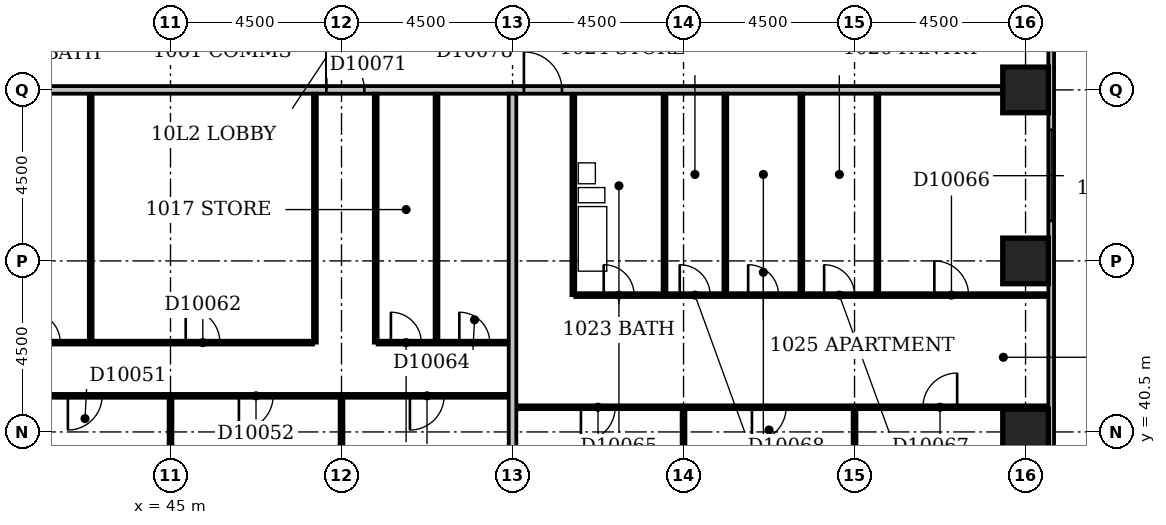
"""IFC4 building model, lengths in metres.
Left out: names, types, materials, properties, quantities, classifications, styles, units other than length and angle.
Written with IfcOpenShell. Run it as: python <this file> out.ifc"""

import sys

from ifc_helpers import new_model, si_unit, direction, frame, frame_2d, origin, origin_2d, place, context, subcontext, project, spatial, rectangle, extrude, element, fill, save


model = new_model("IFC4")
c1 = context("Model", 3, precision=1e-05, world=origin(), true_north=direction((0.0, 1.0)))
c2 = subcontext(c1, "Body", "Model", "MODEL_VIEW")
j1 = project(units=[si_unit("LENGTHUNIT", "METRE"), si_unit("PLANEANGLEUNIT", "RADIAN")], contexts=[c1])
p1 = place(None, origin())
s1 = spatial("IfcSite", under=j1, at=p1, CompositionType="ELEMENT")
p2 = place(p1, origin())
s2 = spatial("IfcBuilding", under=s1, at=p2, CompositionType="ELEMENT")
p3 = place(p2, frame((0.0, 0.0, 47.0)))
s3 = spatial("IfcBuildingStorey", under=s2, at=p3, CompositionType="ELEMENT", Elevation=47.0)
for number, where, z_axis, x_axis in (
    (1, (67.5, 40.5, -0.3), (0.0, 0.0, 1.0), (1.0, 0.0, 0.0)),
    (2, (67.5, 45.0, -0.3), (0.0, 0.0, 1.0), (1.0, 0.0, 0.0)),
    (3, (67.5, 49.5, -0.3), (0.0, 0.0, 1.0), (1.0, 0.0, 0.0)),
):
    element("IfcColumn", number, at=place(p3, frame(where, z_axis=z_axis, x_axis=x_axis)), inside=s3, PredefinedType="COLUMN", context=c2, shape_type="SweptSolid", body=[
        extrude(rectangle(XDim=1.2, YDim=1.2, at=origin_2d()), origin(), (0.0, 0.0, 1.0), 3.6),
    ])
p4 = place(p3, frame((68.175, 35.4, 0.0), z_axis=(0.0, 0.0, 1.0), x_axis=(0.0, 1.0, 0.0)))
e4 = element("IfcWall", 4, at=p4, inside=s3, PredefinedType="STANDARD", context=c2, shape_type="SweptSolid", body=[
    extrude(rectangle(XDim=23.85, YDim=0.15, at=frame_2d((11.925, 0.0))), origin(), (0.0, 0.0, 1.0), 2.7),
])
p5 = place(p4, frame((2.67, 0.0, 0.6)))
e5 = element("IfcOpeningElement", 5, at=p5, cuts=e4, PredefinedType="OPENING", context=c2, shape_type="SweptSolid", body=[
    extrude(rectangle(XDim=1.5, YDim=1.8, at=frame_2d((0.75, 0.9))), frame((0.0, 0.087, 0.0), z_axis=(0.0, -1.0, 0.0), x_axis=(1.0, 0.0, 0.0)), (0.0, 0.0, 1.0), 0.174),
])
p6 = place(p4, frame((10.65, 0.0, 0.6)))
e6 = element("IfcOpeningElement", 6, at=p6, cuts=e4, PredefinedType="OPENING", context=c2, shape_type="SweptSolid", body=[
    extrude(rectangle(XDim=2.4, YDim=1.8, at=frame_2d((1.2, 0.9))), frame((0.0, 0.087, 0.0), z_axis=(0.0, -1.0, 0.0), x_axis=(1.0, 0.0, 0.0)), (0.0, 0.0, 1.0), 0.174),
])
p7 = place(p4, frame((19.5, 0.0, 0.6)))
e7 = element("IfcOpeningElement", 7, at=p7, cuts=e4, PredefinedType="OPENING", context=c2, shape_type="SweptSolid", body=[
    extrude(rectangle(XDim=2.1, YDim=1.8, at=frame_2d((1.05, 0.9))), frame((0.0, 0.087, 0.0), z_axis=(0.0, -1.0, 0.0), x_axis=(1.0, 0.0, 0.0)), (0.0, 0.0, 1.0), 0.174),
])
p8 = place(p3, frame((45.0, 36.6, 0.0), z_axis=(0.0, 0.0, 1.0), x_axis=(0.0, 1.0, 0.0)))
e8 = element("IfcWall", 8, at=p8, inside=s3, PredefinedType="PARTITIONING", context=c2, shape_type="SweptSolid", body=[
    extrude(rectangle(XDim=4.8, YDim=0.1, at=frame_2d((2.4, 0.0))), origin(), (0.0, 0.0, 1.0), 2.6),
])
p9 = place(p3, frame((49.5, 36.6, 0.0), z_axis=(0.0, 0.0, 1.0), x_axis=(0.0, 1.0, 0.0)))
e9 = element("IfcWall", 9, at=p9, inside=s3, PredefinedType="PARTITIONING", context=c2, shape_type="SweptSolid", body=[
    extrude(rectangle(XDim=4.8, YDim=0.1, at=frame_2d((2.4, 0.0))), origin(), (0.0, 0.0, 1.0), 3.3),
])
p10 = place(p3, frame((54.0, 36.6, 0.0), z_axis=(0.0, 0.0, 1.0), x_axis=(0.0, 1.0, 0.0)))
e10 = element("IfcWall", 10, at=p10, inside=s3, PredefinedType="PARTITIONING", context=c2, shape_type="SweptSolid", body=[
    extrude(rectangle(XDim=12.8, YDim=0.2, at=frame_2d((6.4, 0.0))), origin(), (0.0, 0.0, 1.0), 2.6),
])
p11 = place(p3, frame((58.5, 36.6, 0.0), z_axis=(0.0, 0.0, 1.0), x_axis=(0.0, 1.0, 0.0)))
e11 = element("IfcWall", 11, at=p11, inside=s3, PredefinedType="PARTITIONING", context=c2, shape_type="SweptSolid", body=[
    extrude(rectangle(XDim=4.5, YDim=0.1, at=frame_2d((2.25, 0.0))), origin(), (0.0, 0.0, 1.0), 3.3),
])
p12 = place(p3, frame((63.0, 36.6, 0.0), z_axis=(0.0, 0.0, 1.0), x_axis=(0.0, 1.0, 0.0)))
e12 = element("IfcWall", 12, at=p12, inside=s3, PredefinedType="PARTITIONING", context=c2, shape_type="SweptSolid", body=[
    extrude(rectangle(XDim=4.5, YDim=0.1, at=frame_2d((2.25, 0.0))), origin(), (0.0, 0.0, 1.0), 2.4),
])
p13 = place(p3, frame((54.1, 41.15, 0.0), z_axis=(0.0, 0.0, 1.0), x_axis=(1.0, 0.0, 0.0)))
e13 = element("IfcWall", 13, at=p13, inside=s3, PredefinedType="PARTITIONING", context=c2, shape_type="SweptSolid", body=[
    extrude(rectangle(XDim=14.0, YDim=0.1, at=frame_2d((7.0, 0.0))), origin(), (0.0, 0.0, 1.0), 3.3),
])
p14 = place(p13, frame((1.7, 0.0, 0.0)))
e14 = element("IfcOpeningElement", 14, at=p14, cuts=e13, PredefinedType="OPENING", context=c2, shape_type="SweptSolid", body=[
    extrude(rectangle(XDim=0.9, YDim=2.1, at=frame_2d((0.45, 1.05))), frame((0.0, 0.062, 0.0), z_axis=(0.0, -1.0, 0.0), x_axis=(1.0, 0.0, 0.0)), (0.0, 0.0, 1.0), 0.124),
])
p15 = place(p13, frame((6.2, 0.0, 0.0)))
e15 = element("IfcOpeningElement", 15, at=p15, cuts=e13, PredefinedType="OPENING", context=c2, shape_type="SweptSolid", body=[
    extrude(rectangle(XDim=0.9, YDim=2.1, at=frame_2d((0.45, 1.05))), frame((0.0, 0.062, 0.0), z_axis=(0.0, -1.0, 0.0), x_axis=(1.0, 0.0, 0.0)), (0.0, 0.0, 1.0), 0.124),
])
p16 = place(p13, frame((10.7, 0.0, 0.0)))
e16 = element("IfcOpeningElement", 16, at=p16, cuts=e13, PredefinedType="OPENING", context=c2, shape_type="SweptSolid", body=[
    extrude(rectangle(XDim=0.9, YDim=2.1, at=frame_2d((0.45, 1.05))), frame((0.0, 0.062, 0.0), z_axis=(0.0, -1.0, 0.0), x_axis=(1.0, 0.0, 0.0)), (0.0, 0.0, 1.0), 0.124),
])
p17 = place(p3, frame((40.6, 41.45, 0.0), z_axis=(0.0, 0.0, 1.0), x_axis=(1.0, 0.0, 0.0)))
e17 = element("IfcWall", 17, at=p17, inside=s3, PredefinedType="PARTITIONING", context=c2, shape_type="SweptSolid", body=[
    extrude(rectangle(XDim=13.3, YDim=0.1, at=frame_2d((6.65, 0.0))), origin(), (0.0, 0.0, 1.0), 3.3),
])
p18 = place(p17, frame((1.7, 0.0, 0.0)))
e18 = element("IfcOpeningElement", 18, at=p18, cuts=e17, PredefinedType="OPENING", context=c2, shape_type="SweptSolid", body=[
    extrude(rectangle(XDim=0.9, YDim=2.1, at=frame_2d((0.45, 1.05))), frame((0.0, 0.062, 0.0), z_axis=(0.0, -1.0, 0.0), x_axis=(1.0, 0.0, 0.0)), (0.0, 0.0, 1.0), 0.124),
])
p19 = place(p17, frame((6.2, 0.0, 0.0)))
e19 = element("IfcOpeningElement", 19, at=p19, cuts=e17, PredefinedType="OPENING", context=c2, shape_type="SweptSolid", body=[
    extrude(rectangle(XDim=0.9, YDim=2.1, at=frame_2d((0.45, 1.05))), frame((0.0, 0.062, 0.0), z_axis=(0.0, -1.0, 0.0), x_axis=(1.0, 0.0, 0.0)), (0.0, 0.0, 1.0), 0.124),
])
p20 = place(p17, frame((10.7, 0.0, 0.0)))
e20 = element("IfcOpeningElement", 20, at=p20, cuts=e17, PredefinedType="OPENING", context=c2, shape_type="SweptSolid", body=[
    extrude(rectangle(XDim=0.9, YDim=2.1, at=frame_2d((0.45, 1.05))), frame((0.0, 0.062, 0.0), z_axis=(0.0, -1.0, 0.0), x_axis=(1.0, 0.0, 0.0)), (0.0, 0.0, 1.0), 0.124),
])
p21 = place(p3, frame((40.6, 42.85, 0.0), z_axis=(0.0, 0.0, 1.0), x_axis=(1.0, 0.0, 0.0)))
e21 = element("IfcWall", 21, at=p21, inside=s3, PredefinedType="PARTITIONING", context=c2, shape_type="SweptSolid", body=[
    extrude(rectangle(XDim=8.15, YDim=0.1, at=frame_2d((4.075, 0.0))), origin(), (0.0, 0.0, 1.0), 3.3),
])
p22 = place(p21, frame((0.7, 0.0, 0.0)))
e22 = element("IfcOpeningElement", 22, at=p22, cuts=e21, PredefinedType="OPENING", context=c2, shape_type="SweptSolid", body=[
    extrude(rectangle(XDim=0.8, YDim=2.1, at=frame_2d((0.4, 1.05))), frame((0.0, 0.062, 0.0), z_axis=(0.0, -1.0, 0.0), x_axis=(1.0, 0.0, 0.0)), (0.0, 0.0, 1.0), 0.124),
])
p23 = place(p21, frame((4.8, 0.0, 0.0)))
e23 = element("IfcOpeningElement", 23, at=p23, cuts=e21, PredefinedType="OPENING", context=c2, shape_type="SweptSolid", body=[
    extrude(rectangle(XDim=0.9, YDim=2.1, at=frame_2d((0.45, 1.05))), frame((0.0, 0.062, 0.0), z_axis=(0.0, -1.0, 0.0), x_axis=(1.0, 0.0, 0.0)), (0.0, 0.0, 1.0), 0.124),
])
for number, where, z_axis, x_axis in (
    (24, (48.8, 42.85, 0.0), (0.0, 0.0, 1.0), (0.0, 1.0, 0.0)),
    (25, (50.4, 42.85, 0.0), (0.0, 0.0, 1.0), (0.0, 1.0, 0.0)),
):
    element("IfcWall", number, at=place(p3, frame(where, z_axis=z_axis, x_axis=x_axis)), inside=s3, PredefinedType="PARTITIONING", context=c2, shape_type="SweptSolid", body=[
        extrude(rectangle(XDim=6.55, YDim=0.1, at=frame_2d((3.275, 0.0))), origin(), (0.0, 0.0, 1.0), 3.3),
    ])
p24 = place(p3, frame((50.45, 42.85, 0.0), z_axis=(0.0, 0.0, 1.0), x_axis=(1.0, 0.0, 0.0)))
e26 = element("IfcWall", 26, at=p24, inside=s3, PredefinedType="PARTITIONING", context=c2, shape_type="SweptSolid", body=[
    extrude(rectangle(XDim=3.45, YDim=0.1, at=frame_2d((1.725, 0.0))), origin(), (0.0, 0.0, 1.0), 3.3),
])
p25 = place(p24, frame((0.35, 0.0, 0.0)))
e27 = element("IfcOpeningElement", 27, at=p25, cuts=e26, PredefinedType="OPENING", context=c2, shape_type="SweptSolid", body=[
    extrude(rectangle(XDim=0.8, YDim=2.1, at=frame_2d((0.4, 1.05))), frame((0.0, 0.062, 0.0), z_axis=(0.0, -1.0, 0.0), x_axis=(1.0, 0.0, 0.0)), (0.0, 0.0, 1.0), 0.124),
])
p26 = place(p24, frame((2.15, 0.0, 0.0)))
e28 = element("IfcOpeningElement", 28, at=p26, cuts=e26, PredefinedType="OPENING", context=c2, shape_type="SweptSolid", body=[
    extrude(rectangle(XDim=0.8, YDim=2.1, at=frame_2d((0.4, 1.05))), frame((0.0, 0.062, 0.0), z_axis=(0.0, -1.0, 0.0), x_axis=(1.0, 0.0, 0.0)), (0.0, 0.0, 1.0), 0.124),
])
p27 = place(p3, frame((42.9, 42.9, 0.0), z_axis=(0.0, 0.0, 1.0), x_axis=(0.0, 1.0, 0.0)))
e29 = element("IfcWall", 29, at=p27, inside=s3, PredefinedType="PLUMBINGWALL", context=c2, shape_type="SweptSolid", body=[
    extrude(rectangle(XDim=6.5, YDim=0.1, at=frame_2d((3.25, 0.0))), origin(), (0.0, 0.0, 1.0), 3.3),
])
p28 = place(p3, frame((52.0, 42.9, 0.0), z_axis=(0.0, 0.0, 1.0), x_axis=(0.0, 1.0, 0.0)))
e30 = element("IfcWall", 30, at=p28, inside=s3, PredefinedType="PARTITIONING", context=c2, shape_type="SweptSolid", body=[
    extrude(rectangle(XDim=6.5, YDim=0.1, at=frame_2d((3.25, 0.0))), origin(), (0.0, 0.0, 1.0), 3.3),
])
p29 = place(p3, frame((55.6, 44.1, 0.0), z_axis=(0.0, 0.0, 1.0), x_axis=(0.0, 1.0, 0.0)))
e31 = element("IfcWall", 31, at=p29, inside=s3, PredefinedType="PLUMBINGWALL", context=c2, shape_type="SweptSolid", body=[
    extrude(rectangle(XDim=5.3, YDim=0.1, at=frame_2d((2.65, 0.0))), origin(), (0.0, 0.0, 1.0), 3.3),
])
p30 = place(p3, frame((55.65, 44.1, 0.0), z_axis=(0.0, 0.0, 1.0), x_axis=(1.0, 0.0, 0.0)))
e32 = element("IfcWall", 32, at=p30, inside=s3, PredefinedType="PARTITIONING", context=c2, shape_type="SweptSolid", body=[
    extrude(rectangle(XDim=12.45, YDim=0.1, at=frame_2d((6.225, 0.0))), origin(), (0.0, 0.0, 1.0), 3.3),
])
p31 = place(p30, frame((0.75, 0.0, 0.0)))
e33 = element("IfcOpeningElement", 33, at=p31, cuts=e32, PredefinedType="OPENING", context=c2, shape_type="SweptSolid", body=[
    extrude(rectangle(XDim=0.8, YDim=2.1, at=frame_2d((0.4, 1.05))), frame((0.0, 0.062, 0.0), z_axis=(0.0, -1.0, 0.0), x_axis=(1.0, 0.0, 0.0)), (0.0, 0.0, 1.0), 0.124),
])
p32 = place(p30, frame((9.45, 0.0, 0.0)))
e34 = element("IfcOpeningElement", 34, at=p32, cuts=e32, PredefinedType="OPENING", context=c2, shape_type="SweptSolid", body=[
    extrude(rectangle(XDim=0.9, YDim=2.1, at=frame_2d((0.45, 1.05))), frame((0.0, 0.062, 0.0), z_axis=(0.0, -1.0, 0.0), x_axis=(1.0, 0.0, 0.0)), (0.0, 0.0, 1.0), 0.124),
])
p33 = place(p30, frame((6.55, 0.0, 0.0)))
e35 = element("IfcOpeningElement", 35, at=p33, cuts=e32, PredefinedType="OPENING", context=c2, shape_type="SweptSolid", body=[
    extrude(rectangle(XDim=0.8, YDim=2.1, at=frame_2d((0.4, 1.05))), frame((0.0, 0.062, 0.0), z_axis=(0.0, -1.0, 0.0), x_axis=(1.0, 0.0, 0.0)), (0.0, 0.0, 1.0), 0.124),
])
p34 = place(p30, frame((2.75, 0.0, 0.0)))
e36 = element("IfcOpeningElement", 36, at=p34, cuts=e32, PredefinedType="OPENING", context=c2, shape_type="SweptSolid", body=[
    extrude(rectangle(XDim=0.8, YDim=2.1, at=frame_2d((0.4, 1.05))), frame((0.0, 0.062, 0.0), z_axis=(0.0, -1.0, 0.0), x_axis=(1.0, 0.0, 0.0)), (0.0, 0.0, 1.0), 0.124),
])
p35 = place(p30, frame((4.55, 0.0, 0.0)))
e37 = element("IfcOpeningElement", 37, at=p35, cuts=e32, PredefinedType="OPENING", context=c2, shape_type="SweptSolid", body=[
    extrude(rectangle(XDim=0.8, YDim=2.1, at=frame_2d((0.4, 1.05))), frame((0.0, 0.062, 0.0), z_axis=(0.0, -1.0, 0.0), x_axis=(1.0, 0.0, 0.0)), (0.0, 0.0, 1.0), 0.124),
])
p36 = place(p3, frame((58.0, 44.15, 0.0), z_axis=(0.0, 0.0, 1.0), x_axis=(0.0, 1.0, 0.0)))
e38 = element("IfcWall", 38, at=p36, inside=s3, PredefinedType="PLUMBINGWALL", context=c2, shape_type="SweptSolid", body=[
    extrude(rectangle(XDim=5.25, YDim=0.1, at=frame_2d((2.625, 0.0))), origin(), (0.0, 0.0, 1.0), 3.3),
])
for number, where, z_axis, x_axis in (
    (39, (59.6, 44.15, 0.0), (0.0, 0.0, 1.0), (0.0, 1.0, 0.0)),
    (40, (61.6, 44.15, 0.0), (0.0, 0.0, 1.0), (0.0, 1.0, 0.0)),
):
    element("IfcWall", number, at=place(p3, frame(where, z_axis=z_axis, x_axis=x_axis)), inside=s3, PredefinedType="PARTITIONING", context=c2, shape_type="SweptSolid", body=[
        extrude(rectangle(XDim=5.25, YDim=0.1, at=frame_2d((2.625, 0.0))), origin(), (0.0, 0.0, 1.0), 3.3),
    ])
p37 = place(p3, frame((63.6, 44.15, 0.0), z_axis=(0.0, 0.0, 1.0), x_axis=(0.0, 1.0, 0.0)))
e41 = element("IfcWall", 41, at=p37, inside=s3, PredefinedType="PARTITIONING", context=c2, shape_type="SweptSolid", body=[
    extrude(rectangle(XDim=5.25, YDim=0.1, at=frame_2d((2.625, 0.0))), origin(), (0.0, 0.0, 1.0), 2.4),
])
p38 = place(p3, frame((9.1, 49.5, 0.0), z_axis=(0.0, 0.0, 1.0), x_axis=(1.0, 0.0, 0.0)))
e42 = element("IfcWall", 42, at=p38, inside=s3, PredefinedType="PARTITIONING", context=c2, shape_type="SweptSolid", body=[
    extrude(rectangle(XDim=57.8, YDim=0.2, at=frame_2d((28.9, 0.0))), origin(), (0.0, 0.0, 1.0), 3.3),
])
p39 = place(p38, frame((16.1, 0.0, 0.0)))
e43 = element("IfcOpeningElement", 43, at=p39, cuts=e42, PredefinedType="OPENING", context=c2, shape_type="SweptSolid", body=[
    extrude(rectangle(XDim=1.0, YDim=2.1, at=frame_2d((0.5, 1.05))), frame((0.0, 0.112, 0.0), z_axis=(0.0, -1.0, 0.0), x_axis=(1.0, 0.0, 0.0)), (0.0, 0.0, 1.0), 0.224),
])
p40 = place(p38, frame((40.0, 0.0, 0.0)))
e44 = element("IfcOpeningElement", 44, at=p40, cuts=e42, PredefinedType="OPENING", context=c2, shape_type="SweptSolid", body=[
    extrude(rectangle(XDim=1.0, YDim=2.1, at=frame_2d((0.5, 1.05))), frame((0.0, 0.112, 0.0), z_axis=(0.0, -1.0, 0.0), x_axis=(1.0, 0.0, 0.0)), (0.0, 0.0, 1.0), 0.224),
])
p41 = place(p38, frame((45.2, 0.0, 0.0)))
e45 = element("IfcOpeningElement", 45, at=p41, cuts=e42, PredefinedType="OPENING", context=c2, shape_type="SweptSolid", body=[
    extrude(rectangle(XDim=1.0, YDim=2.1, at=frame_2d((0.5, 1.05))), frame((0.0, 0.112, 0.0), z_axis=(0.0, -1.0, 0.0), x_axis=(1.0, 0.0, 0.0)), (0.0, 0.0, 1.0), 0.224),
])
p42 = place(p38, frame((3.9, 0.0, 0.0)))
e46 = element("IfcOpeningElement", 46, at=p42, cuts=e42, PredefinedType="OPENING", context=c2, shape_type="SweptSolid", body=[
    extrude(rectangle(XDim=0.9, YDim=2.1, at=frame_2d((0.45, 1.05))), frame((0.0, 0.112, 0.0), z_axis=(0.0, -1.0, 0.0), x_axis=(1.0, 0.0, 0.0)), (0.0, 0.0, 1.0), 0.224),
])
p43 = place(p6, origin())
e47 = element("IfcWindow", 47, at=p43, inside=s3, PartitioningType="SINGLE_PANEL", PredefinedType="WINDOW", context=c2, shape_type="SweptSolid", body=[
    extrude(rectangle(XDim=2.4, YDim=1.8, at=frame_2d((1.2, 0.9))), frame((0.0, 0.03, 0.0), z_axis=(0.0, -1.0, 0.0), x_axis=(1.0, 0.0, 0.0)), (0.0, 0.0, 1.0), 0.06),
])
fill(e6, e47)
p44 = place(p14, frame((0.9, 0.0, 0.0), z_axis=(0.0, 0.0, 1.0), x_axis=(-1.0, 0.0, 0.0)))
e48 = element("IfcDoor", 48, at=p44, inside=s3, OperationType="SINGLE_SWING_RIGHT", PredefinedType="DOOR", context=c2, shape_type="SweptSolid", body=[
    extrude(rectangle(XDim=0.9, YDim=2.1, at=frame_2d((0.45, 1.05))), frame((0.0, 0.025, 0.0), z_axis=(0.0, -1.0, 0.0), x_axis=(1.0, 0.0, 0.0)), (0.0, 0.0, 1.0), 0.05),
])
fill(e14, e48)
p45 = place(p15, frame((0.9, 0.0, 0.0), z_axis=(0.0, 0.0, 1.0), x_axis=(-1.0, 0.0, 0.0)))
e49 = element("IfcDoor", 49, at=p45, inside=s3, OperationType="SINGLE_SWING_RIGHT", PredefinedType="DOOR", context=c2, shape_type="SweptSolid", body=[
    extrude(rectangle(XDim=0.9, YDim=2.1, at=frame_2d((0.45, 1.05))), frame((0.0, 0.025, 0.0), z_axis=(0.0, -1.0, 0.0), x_axis=(1.0, 0.0, 0.0)), (0.0, 0.0, 1.0), 0.05),
])
fill(e15, e49)
p46 = place(p16, frame((0.9, 0.0, 0.0), z_axis=(0.0, 0.0, 1.0), x_axis=(-1.0, 0.0, 0.0)))
e50 = element("IfcDoor", 50, at=p46, inside=s3, OperationType="SINGLE_SWING_LEFT", PredefinedType="DOOR", context=c2, shape_type="SweptSolid", body=[
    extrude(rectangle(XDim=0.9, YDim=2.1, at=frame_2d((0.45, 1.05))), frame((0.0, 0.025, 0.0), z_axis=(0.0, -1.0, 0.0), x_axis=(1.0, 0.0, 0.0)), (0.0, 0.0, 1.0), 0.05),
])
fill(e16, e50)
p47 = place(p18, frame((0.9, 0.0, 0.0), z_axis=(0.0, 0.0, 1.0), x_axis=(-1.0, 0.0, 0.0)))
e51 = element("IfcDoor", 51, at=p47, inside=s3, OperationType="SINGLE_SWING_RIGHT", PredefinedType="DOOR", context=c2, shape_type="SweptSolid", body=[
    extrude(rectangle(XDim=0.9, YDim=2.1, at=frame_2d((0.45, 1.05))), frame((0.0, 0.025, 0.0), z_axis=(0.0, -1.0, 0.0), x_axis=(1.0, 0.0, 0.0)), (0.0, 0.0, 1.0), 0.05),
])
fill(e18, e51)
p48 = place(p19, frame((0.9, 0.0, 0.0), z_axis=(0.0, 0.0, 1.0), x_axis=(-1.0, 0.0, 0.0)))
e52 = element("IfcDoor", 52, at=p48, inside=s3, OperationType="SINGLE_SWING_RIGHT", PredefinedType="DOOR", context=c2, shape_type="SweptSolid", body=[
    extrude(rectangle(XDim=0.9, YDim=2.1, at=frame_2d((0.45, 1.05))), frame((0.0, 0.025, 0.0), z_axis=(0.0, -1.0, 0.0), x_axis=(1.0, 0.0, 0.0)), (0.0, 0.0, 1.0), 0.05),
])
fill(e19, e52)
p49 = place(p20, frame((0.9, 0.0, 0.0), z_axis=(0.0, 0.0, 1.0), x_axis=(-1.0, 0.0, 0.0)))
e53 = element("IfcDoor", 53, at=p49, inside=s3, OperationType="SINGLE_SWING_RIGHT", PredefinedType="DOOR", context=c2, shape_type="SweptSolid", body=[
    extrude(rectangle(XDim=0.9, YDim=2.1, at=frame_2d((0.45, 1.05))), frame((0.0, 0.025, 0.0), z_axis=(0.0, -1.0, 0.0), x_axis=(1.0, 0.0, 0.0)), (0.0, 0.0, 1.0), 0.05),
])
fill(e20, e53)
p50 = place(p22, origin())
e54 = element("IfcDoor", 54, at=p50, inside=s3, OperationType="SINGLE_SWING_LEFT", PredefinedType="DOOR", context=c2, shape_type="SweptSolid", body=[
    extrude(rectangle(XDim=0.8, YDim=2.1, at=frame_2d((0.4, 1.05))), frame((0.0, 0.025, 0.0), z_axis=(0.0, -1.0, 0.0), x_axis=(1.0, 0.0, 0.0)), (0.0, 0.0, 1.0), 0.05),
])
fill(e22, e54)
p51 = place(p23, origin())
e55 = element("IfcDoor", 55, at=p51, inside=s3, OperationType="SINGLE_SWING_LEFT", PredefinedType="DOOR", context=c2, shape_type="SweptSolid", body=[
    extrude(rectangle(XDim=0.9, YDim=2.1, at=frame_2d((0.45, 1.05))), frame((0.0, 0.025, 0.0), z_axis=(0.0, -1.0, 0.0), x_axis=(1.0, 0.0, 0.0)), (0.0, 0.0, 1.0), 0.05),
])
fill(e23, e55)
p52 = place(p25, origin())
e56 = element("IfcDoor", 56, at=p52, inside=s3, OperationType="SINGLE_SWING_LEFT", PredefinedType="DOOR", context=c2, shape_type="SweptSolid", body=[
    extrude(rectangle(XDim=0.8, YDim=2.1, at=frame_2d((0.4, 1.05))), frame((0.0, 0.025, 0.0), z_axis=(0.0, -1.0, 0.0), x_axis=(1.0, 0.0, 0.0)), (0.0, 0.0, 1.0), 0.05),
])
fill(e27, e56)
p53 = place(p26, origin())
e57 = element("IfcDoor", 57, at=p53, inside=s3, OperationType="SINGLE_SWING_LEFT", PredefinedType="DOOR", context=c2, shape_type="SweptSolid", body=[
    extrude(rectangle(XDim=0.8, YDim=2.1, at=frame_2d((0.4, 1.05))), frame((0.0, 0.025, 0.0), z_axis=(0.0, -1.0, 0.0), x_axis=(1.0, 0.0, 0.0)), (0.0, 0.0, 1.0), 0.05),
])
fill(e28, e57)
p54 = place(p31, origin())
e58 = element("IfcDoor", 58, at=p54, inside=s3, OperationType="SINGLE_SWING_LEFT", PredefinedType="DOOR", context=c2, shape_type="SweptSolid", body=[
    extrude(rectangle(XDim=0.8, YDim=2.1, at=frame_2d((0.4, 1.05))), frame((0.0, 0.025, 0.0), z_axis=(0.0, -1.0, 0.0), x_axis=(1.0, 0.0, 0.0)), (0.0, 0.0, 1.0), 0.05),
])
fill(e33, e58)
p55 = place(p32, origin())
e59 = element("IfcDoor", 59, at=p55, inside=s3, OperationType="SINGLE_SWING_LEFT", PredefinedType="DOOR", context=c2, shape_type="SweptSolid", body=[
    extrude(rectangle(XDim=0.9, YDim=2.1, at=frame_2d((0.45, 1.05))), frame((0.0, 0.025, 0.0), z_axis=(0.0, -1.0, 0.0), x_axis=(1.0, 0.0, 0.0)), (0.0, 0.0, 1.0), 0.05),
])
fill(e34, e59)
p56 = place(p33, origin())
e60 = element("IfcDoor", 60, at=p56, inside=s3, OperationType="SINGLE_SWING_LEFT", PredefinedType="DOOR", context=c2, shape_type="SweptSolid", body=[
    extrude(rectangle(XDim=0.8, YDim=2.1, at=frame_2d((0.4, 1.05))), frame((0.0, 0.025, 0.0), z_axis=(0.0, -1.0, 0.0), x_axis=(1.0, 0.0, 0.0)), (0.0, 0.0, 1.0), 0.05),
])
fill(e35, e60)
p57 = place(p34, origin())
e61 = element("IfcDoor", 61, at=p57, inside=s3, OperationType="SINGLE_SWING_LEFT", PredefinedType="DOOR", context=c2, shape_type="SweptSolid", body=[
    extrude(rectangle(XDim=0.8, YDim=2.1, at=frame_2d((0.4, 1.05))), frame((0.0, 0.025, 0.0), z_axis=(0.0, -1.0, 0.0), x_axis=(1.0, 0.0, 0.0)), (0.0, 0.0, 1.0), 0.05),
])
fill(e36, e61)
p58 = place(p35, origin())
e62 = element("IfcDoor", 62, at=p58, inside=s3, OperationType="SINGLE_SWING_LEFT", PredefinedType="DOOR", context=c2, shape_type="SweptSolid", body=[
    extrude(rectangle(XDim=0.8, YDim=2.1, at=frame_2d((0.4, 1.05))), frame((0.0, 0.025, 0.0), z_axis=(0.0, -1.0, 0.0), x_axis=(1.0, 0.0, 0.0)), (0.0, 0.0, 1.0), 0.05),
])
fill(e37, e62)
p59 = place(p40, origin())
e63 = element("IfcDoor", 63, at=p59, inside=s3, OperationType="SINGLE_SWING_LEFT", PredefinedType="DOOR", context=c2, shape_type="SweptSolid", body=[
    extrude(rectangle(XDim=1.0, YDim=2.1, at=frame_2d((0.5, 1.05))), frame((0.0, 0.025, 0.0), z_axis=(0.0, -1.0, 0.0), x_axis=(1.0, 0.0, 0.0)), (0.0, 0.0, 1.0), 0.05),
])
fill(e44, e63)
p60 = place(p41, origin())
e64 = element("IfcDoor", 64, at=p60, inside=s3, OperationType="SINGLE_SWING_LEFT", PredefinedType="DOOR", context=c2, shape_type="SweptSolid", body=[
    extrude(rectangle(XDim=1.0, YDim=2.1, at=frame_2d((0.5, 1.05))), frame((0.0, 0.025, 0.0), z_axis=(0.0, -1.0, 0.0), x_axis=(1.0, 0.0, 0.0)), (0.0, 0.0, 1.0), 0.05),
])
fill(e45, e64)
save(model, sys.argv[1])
